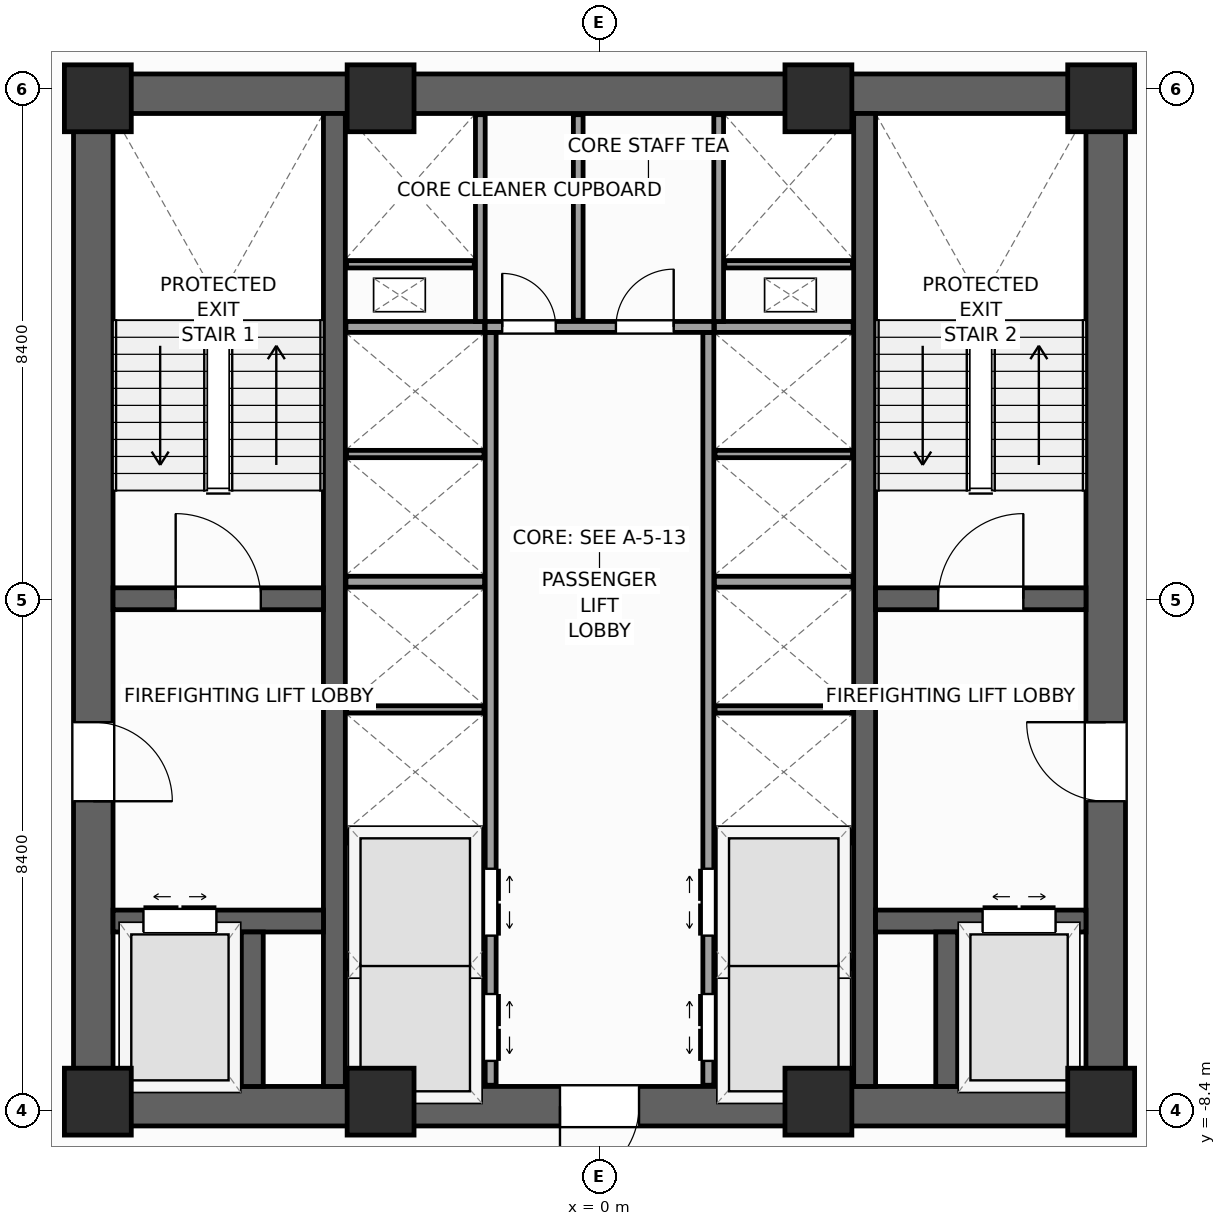
"""IFC4 building model, lengths in metres.
Left out: names, types, materials, properties, quantities, classifications, styles, units other than length and angle.
Written with IfcOpenShell. Run it as: python <this file> out.ifc"""

import sys

from ifc_helpers import new_model, si_unit, direction, frame, frame_2d, origin, origin_2d, place, context, subcontext, project, spatial, rectangle, extrude, source, transform, mapped, element, fill, save


model = new_model("IFC4")
c1 = context("Model", 3, precision=1e-05, world=origin(), true_north=direction((0.0, 1.0)))
c2 = subcontext(c1, "Body", "Model", "MODEL_VIEW")
j1 = project(units=[si_unit("LENGTHUNIT", "METRE"), si_unit("PLANEANGLEUNIT", "RADIAN")], contexts=[c1])
p1 = place(None, origin())
s1 = spatial("IfcSite", under=j1, at=p1, CompositionType="ELEMENT")
p2 = place(p1, origin())
s2 = spatial("IfcBuilding", under=s1, at=p2, CompositionType="ELEMENT")
p3 = place(p2, frame((0.0, 0.0, 103.2)))
s3 = spatial("IfcBuildingStorey", under=s2, at=p3, CompositionType="ELEMENT", Elevation=103.2)
p4 = place(p3, frame((-8.65, -8.325, 0.0), z_axis=(0.0, 0.0, 1.0), x_axis=(1.0, 0.0, 0.0)))
e1 = element("IfcWall", 1, at=p4, inside=s3, PredefinedType="SHEAR", context=c2, shape_type="SweptSolid", body=[
    extrude(rectangle(XDim=17.3, YDim=0.65, at=frame_2d((8.65, 0.0))), origin(), (0.0, 0.0, 1.0), 4.0),
])
p5 = place(p4, frame((8.0, 0.0, 0.0)))
e2 = element("IfcOpeningElement", 2, at=p5, cuts=e1, PredefinedType="OPENING", context=c2, shape_type="SweptSolid", body=[
    extrude(rectangle(XDim=1.3, YDim=2.2, at=frame_2d((0.65, 1.1))), frame((0.0, 0.335, 0.0), z_axis=(0.0, -1.0, 0.0), x_axis=(1.0, 0.0, 0.0)), (0.0, 0.0, 1.0), 0.67),
])
p6 = place(p3, frame((-8.65, 8.325, 0.0), z_axis=(0.0, 0.0, 1.0), x_axis=(1.0, 0.0, 0.0)))
e3 = element("IfcWall", 3, at=p6, inside=s3, PredefinedType="SHEAR", context=c2, shape_type="SweptSolid", body=[
    extrude(rectangle(XDim=17.3, YDim=0.65, at=frame_2d((8.65, 0.0))), origin(), (0.0, 0.0, 1.0), 4.0),
])
p7 = place(p3, frame((-8.325, -8.0, 0.0), z_axis=(0.0, 0.0, 1.0), x_axis=(0.0, 1.0, 0.0)))
e4 = element("IfcWall", 4, at=p7, inside=s3, PredefinedType="SHEAR", context=c2, shape_type="SweptSolid", body=[
    extrude(rectangle(XDim=16.0, YDim=0.65, at=frame_2d((8.0, 0.0))), origin(), (0.0, 0.0, 1.0), 4.0),
])
p8 = place(p7, frame((4.69, 0.0, 0.0)))
e5 = element("IfcOpeningElement", 5, at=p8, cuts=e4, PredefinedType="OPENING", context=c2, shape_type="SweptSolid", body=[
    extrude(rectangle(XDim=1.3, YDim=2.2, at=frame_2d((0.65, 1.1))), frame((0.0, 0.335, 0.0), z_axis=(0.0, -1.0, 0.0), x_axis=(1.0, 0.0, 0.0)), (0.0, 0.0, 1.0), 0.67),
])
p9 = place(p3, frame((8.325, -8.0, 0.0), z_axis=(0.0, 0.0, 1.0), x_axis=(0.0, 1.0, 0.0)))
e6 = element("IfcWall", 6, at=p9, inside=s3, PredefinedType="SHEAR", context=c2, shape_type="SweptSolid", body=[
    extrude(rectangle(XDim=16.0, YDim=0.65, at=frame_2d((8.0, 0.0))), origin(), (0.0, 0.0, 1.0), 4.0),
])
p10 = place(p9, frame((4.69, 0.0, 0.0)))
e7 = element("IfcOpeningElement", 7, at=p10, cuts=e6, PredefinedType="OPENING", context=c2, shape_type="SweptSolid", body=[
    extrude(rectangle(XDim=1.3, YDim=2.2, at=frame_2d((0.65, 1.1))), frame((0.0, 0.335, 0.0), z_axis=(0.0, -1.0, 0.0), x_axis=(1.0, 0.0, 0.0)), (0.0, 0.0, 1.0), 0.67),
])
for number, where, z_axis, x_axis in (
    (8, (-4.36, -8.0, 0.0), (0.0, 0.0, 1.0), (0.0, 1.0, 0.0)),
    (9, (4.36, -8.0, 0.0), (0.0, 0.0, 1.0), (0.0, 1.0, 0.0)),
):
    element("IfcWall", number, at=place(p3, frame(where, z_axis=z_axis, x_axis=x_axis)), inside=s3, PredefinedType="SHEAR", context=c2, shape_type="SweptSolid", body=[
        extrude(rectangle(XDim=16.0, YDim=0.36, at=frame_2d((8.0, 0.0))), origin(), (0.0, 0.0, 1.0), 4.0),
    ])
p11 = place(p3, frame((-8.0, 0.02, 0.0), z_axis=(0.0, 0.0, 1.0), x_axis=(1.0, 0.0, 0.0)))
e10 = element("IfcWall", 10, at=p11, inside=s3, PredefinedType="SHEAR", context=c2, shape_type="SweptSolid", body=[
    extrude(rectangle(XDim=3.46, YDim=0.36, at=frame_2d((1.73, 0.0))), origin(), (0.0, 0.0, 1.0), 4.0),
])
p12 = place(p11, frame((1.03, 0.0, 0.0)))
e11 = element("IfcOpeningElement", 11, at=p12, cuts=e10, PredefinedType="OPENING", context=c2, shape_type="SweptSolid", body=[
    extrude(rectangle(XDim=1.4, YDim=2.2, at=frame_2d((0.7, 1.1))), frame((0.0, 0.19, 0.0), z_axis=(0.0, -1.0, 0.0), x_axis=(1.0, 0.0, 0.0)), (0.0, 0.0, 1.0), 0.38),
])
p13 = place(p3, frame((4.54, 0.02, 0.0), z_axis=(0.0, 0.0, 1.0), x_axis=(1.0, 0.0, 0.0)))
e12 = element("IfcWall", 12, at=p13, inside=s3, PredefinedType="SHEAR", context=c2, shape_type="SweptSolid", body=[
    extrude(rectangle(XDim=3.46, YDim=0.36, at=frame_2d((1.73, 0.0))), origin(), (0.0, 0.0, 1.0), 4.0),
])
p14 = place(p13, frame((1.03, 0.0, 0.0)))
e13 = element("IfcOpeningElement", 13, at=p14, cuts=e12, PredefinedType="OPENING", context=c2, shape_type="SweptSolid", body=[
    extrude(rectangle(XDim=1.4, YDim=2.2, at=frame_2d((0.7, 1.1))), frame((0.0, 0.19, 0.0), z_axis=(0.0, -1.0, 0.0), x_axis=(1.0, 0.0, 0.0)), (0.0, 0.0, 1.0), 0.38),
])
p15 = place(p3, frame((-8.0, -5.28, 0.0), z_axis=(0.0, 0.0, 1.0), x_axis=(1.0, 0.0, 0.0)))
e14 = element("IfcWall", 14, at=p15, inside=s3, PredefinedType="SHEAR", context=c2, shape_type="SweptSolid", body=[
    extrude(rectangle(XDim=3.46, YDim=0.36, at=frame_2d((1.73, 0.0))), origin(), (0.0, 0.0, 1.0), 4.0),
])
p16 = place(p15, frame((0.5, 0.0, 0.0)))
e15 = element("IfcOpeningElement", 15, at=p16, cuts=e14, PredefinedType="OPENING", context=c2, shape_type="SweptSolid", body=[
    extrude(rectangle(XDim=1.2, YDim=2.25, at=frame_2d((0.6, 1.125))), frame((0.0, 0.19, 0.0), z_axis=(0.0, -1.0, 0.0), x_axis=(1.0, 0.0, 0.0)), (0.0, 0.0, 1.0), 0.38),
])
p17 = place(p3, frame((4.54, -5.28, 0.0), z_axis=(0.0, 0.0, 1.0), x_axis=(1.0, 0.0, 0.0)))
e16 = element("IfcWall", 16, at=p17, inside=s3, PredefinedType="SHEAR", context=c2, shape_type="SweptSolid", body=[
    extrude(rectangle(XDim=3.46, YDim=0.36, at=frame_2d((1.73, 0.0))), origin(), (0.0, 0.0, 1.0), 4.0),
])
p18 = place(p17, frame((1.76, 0.0, 0.0)))
e17 = element("IfcOpeningElement", 17, at=p18, cuts=e16, PredefinedType="OPENING", context=c2, shape_type="SweptSolid", body=[
    extrude(rectangle(XDim=1.2, YDim=2.25, at=frame_2d((0.6, 1.125))), frame((0.0, 0.19, 0.0), z_axis=(0.0, -1.0, 0.0), x_axis=(1.0, 0.0, 0.0)), (0.0, 0.0, 1.0), 0.38),
])
for number, where, z_axis, x_axis in (
    (18, (-5.71, -8.0, 0.0), (0.0, 0.0, 1.0), (0.0, 1.0, 0.0)),
    (19, (5.71, -8.0, 0.0), (0.0, 0.0, 1.0), (0.0, 1.0, 0.0)),
):
    element("IfcWall", number, at=place(p3, frame(where, z_axis=z_axis, x_axis=x_axis)), inside=s3, PredefinedType="SHEAR", context=c2, shape_type="SweptSolid", body=[
        extrude(rectangle(XDim=2.54, YDim=0.36, at=frame_2d((1.27, 0.0))), origin(), (0.0, 0.0, 1.0), 4.0),
    ])
m1 = source(origin(), c2, "Body", "SweptSolid", [
    extrude(rectangle(XDim=1.1, YDim=1.1, at=origin_2d()), origin(), (0.0, 0.0, 1.0), 4.0),
])
for number, where, z_axis, x_axis in (
    (20, (-8.25, -8.25, 0.0), (0.0, 0.0, 1.0), (1.0, 0.0, 0.0)),
    (21, (8.25, -8.25, 0.0), (0.0, 0.0, 1.0), (1.0, 0.0, 0.0)),
    (22, (8.25, 8.25, 0.0), (0.0, 0.0, 1.0), (1.0, 0.0, 0.0)),
    (23, (-8.25, 8.25, 0.0), (0.0, 0.0, 1.0), (1.0, 0.0, 0.0)),
    (24, (-3.6, -8.25, 0.0), (0.0, 0.0, 1.0), (1.0, 0.0, 0.0)),
    (25, (3.6, -8.25, 0.0), (0.0, 0.0, 1.0), (1.0, 0.0, 0.0)),
    (26, (-3.6, 8.25, 0.0), (0.0, 0.0, 1.0), (1.0, 0.0, 0.0)),
    (27, (3.6, 8.25, 0.0), (0.0, 0.0, 1.0), (1.0, 0.0, 0.0)),
):
    element("IfcColumn", number, at=place(p3, frame(where, z_axis=z_axis, x_axis=x_axis)), inside=s3, PredefinedType="PILASTER", context=c2, shape_type="MappedRepresentation", body=[
        mapped(m1, transform((0.0, 0.0, 0.0), scale=1.0)),
    ])
p19 = place(p3, frame((-1.79, -7.98, 0.0), z_axis=(0.0, 0.0, 1.0), x_axis=(0.0, 1.0, 0.0)))
e28 = element("IfcWall", 28, at=p19, inside=s3, PredefinedType="PARTITIONING", context=c2, shape_type="SweptSolid", body=[
    extrude(rectangle(XDim=12.38, YDim=0.18, at=frame_2d((6.19, 0.0))), origin(), (0.0, 0.0, 1.0), 3.74),
])
p20 = place(p19, frame((0.4, 0.0, 0.0)))
e29 = element("IfcOpeningElement", 29, at=p20, cuts=e28, PredefinedType="OPENING", context=c2, shape_type="SweptSolid", body=[
    extrude(rectangle(XDim=1.1, YDim=2.2, at=frame_2d((0.55, 1.1))), frame((0.0, 0.1, 0.0), z_axis=(0.0, -1.0, 0.0), x_axis=(1.0, 0.0, 0.0)), (0.0, 0.0, 1.0), 0.2),
])
p21 = place(p19, frame((2.46, 0.0, 0.0)))
e30 = element("IfcOpeningElement", 30, at=p21, cuts=e28, PredefinedType="OPENING", context=c2, shape_type="SweptSolid", body=[
    extrude(rectangle(XDim=1.1, YDim=2.2, at=frame_2d((0.55, 1.1))), frame((0.0, 0.1, 0.0), z_axis=(0.0, -1.0, 0.0), x_axis=(1.0, 0.0, 0.0)), (0.0, 0.0, 1.0), 0.2),
])
p22 = place(p3, frame((1.79, -7.98, 0.0), z_axis=(0.0, 0.0, 1.0), x_axis=(0.0, 1.0, 0.0)))
e31 = element("IfcWall", 31, at=p22, inside=s3, PredefinedType="PARTITIONING", context=c2, shape_type="SweptSolid", body=[
    extrude(rectangle(XDim=12.38, YDim=0.18, at=frame_2d((6.19, 0.0))), origin(), (0.0, 0.0, 1.0), 3.74),
])
p23 = place(p22, frame((0.4, 0.0, 0.0)))
e32 = element("IfcOpeningElement", 32, at=p23, cuts=e31, PredefinedType="OPENING", context=c2, shape_type="SweptSolid", body=[
    extrude(rectangle(XDim=1.1, YDim=2.2, at=frame_2d((0.55, 1.1))), frame((0.0, 0.1, 0.0), z_axis=(0.0, -1.0, 0.0), x_axis=(1.0, 0.0, 0.0)), (0.0, 0.0, 1.0), 0.2),
])
p24 = place(p22, frame((2.46, 0.0, 0.0)))
e33 = element("IfcOpeningElement", 33, at=p24, cuts=e31, PredefinedType="OPENING", context=c2, shape_type="SweptSolid", body=[
    extrude(rectangle(XDim=1.1, YDim=2.2, at=frame_2d((0.55, 1.1))), frame((0.0, 0.1, 0.0), z_axis=(0.0, -1.0, 0.0), x_axis=(1.0, 0.0, 0.0)), (0.0, 0.0, 1.0), 0.2),
])
p25 = place(p3, frame((-1.88, 4.49, 0.0), z_axis=(0.0, 0.0, 1.0), x_axis=(1.0, 0.0, 0.0)))
e34 = element("IfcWall", 34, at=p25, inside=s3, PredefinedType="PARTITIONING", context=c2, shape_type="SweptSolid", body=[
    extrude(rectangle(XDim=3.76, YDim=0.18, at=frame_2d((1.88, 0.0))), origin(), (0.0, 0.0, 1.0), 3.74),
])
p26 = place(p25, frame((0.28, 0.0, 0.0)))
e35 = element("IfcOpeningElement", 35, at=p26, cuts=e34, PredefinedType="OPENING", context=c2, shape_type="SweptSolid", body=[
    extrude(rectangle(XDim=0.88, YDim=2.1, at=frame_2d((0.44, 1.05))), frame((0.0, 0.1, 0.0), z_axis=(0.0, -1.0, 0.0), x_axis=(1.0, 0.0, 0.0)), (0.0, 0.0, 1.0), 0.2),
])
p27 = place(p25, frame((2.15, 0.0, 0.0)))
e36 = element("IfcOpeningElement", 36, at=p27, cuts=e34, PredefinedType="OPENING", context=c2, shape_type="SweptSolid", body=[
    extrude(rectangle(XDim=0.95, YDim=2.1, at=frame_2d((0.475, 1.05))), frame((0.0, 0.1, 0.0), z_axis=(0.0, -1.0, 0.0), x_axis=(1.0, 0.0, 0.0)), (0.0, 0.0, 1.0), 0.2),
])
for number, where, z_axis, x_axis in (
    (37, (-4.17, -3.9, 0.0), (0.0, 0.0, 1.0), (1.0, 0.0, 0.0)),
    (38, (1.89, -3.9, 0.0), (0.0, 0.0, 1.0), (1.0, 0.0, 0.0)),
    (39, (-4.17, 0.3, 0.0), (0.0, 0.0, 1.0), (1.0, 0.0, 0.0)),
    (40, (1.89, 0.3, 0.0), (0.0, 0.0, 1.0), (1.0, 0.0, 0.0)),
    (41, (-4.17, 4.49, 0.0), (0.0, 0.0, 1.0), (1.0, 0.0, 0.0)),
    (42, (1.89, 4.49, 0.0), (0.0, 0.0, 1.0), (1.0, 0.0, 0.0)),
):
    element("IfcWall", number, at=place(p3, frame(where, z_axis=z_axis, x_axis=x_axis)), inside=s3, PredefinedType="PARTITIONING", context=c2, shape_type="SweptSolid", body=[
        extrude(rectangle(XDim=2.28, YDim=0.18, at=frame_2d((1.14, 0.0))), origin(), (0.0, 0.0, 1.0), 3.74),
    ])
for number, where, z_axis, x_axis in (
    (43, (-4.16, -6.0, 0.0), (0.0, 0.0, 1.0), (1.0, 0.0, 0.0)),
    (44, (1.9, -6.0, 0.0), (0.0, 0.0, 1.0), (1.0, 0.0, 0.0)),
    (45, (-4.16, -1.8, 0.0), (0.0, 0.0, 1.0), (1.0, 0.0, 0.0)),
    (46, (1.9, -1.8, 0.0), (0.0, 0.0, 1.0), (1.0, 0.0, 0.0)),
    (47, (-4.16, 2.4, 0.0), (0.0, 0.0, 1.0), (1.0, 0.0, 0.0)),
    (48, (1.9, 2.4, 0.0), (0.0, 0.0, 1.0), (1.0, 0.0, 0.0)),
):
    element("IfcWall", number, at=place(p3, frame(where, z_axis=z_axis, x_axis=x_axis)), inside=s3, PredefinedType="PARTITIONING", context=c2, shape_type="SweptSolid", body=[
        extrude(rectangle(XDim=2.26, YDim=0.12, at=frame_2d((1.13, 0.0))), origin(), (0.0, 0.0, 1.0), 3.74),
    ])
for number, where, z_axis, x_axis in (
    (49, (-1.96, 4.58, 0.0), (0.0, 0.0, 1.0), (0.0, 1.0, 0.0)),
    (50, (1.96, 4.58, 0.0), (0.0, 0.0, 1.0), (0.0, 1.0, 0.0)),
):
    element("IfcWall", number, at=place(p3, frame(where, z_axis=z_axis, x_axis=x_axis)), inside=s3, PredefinedType="PARTITIONING", context=c2, shape_type="SweptSolid", body=[
        extrude(rectangle(XDim=3.4, YDim=0.16, at=frame_2d((1.7, 0.0))), origin(), (0.0, 0.0, 1.0), 3.74),
    ])
for number, where, z_axis, x_axis in (
    (51, (-4.16, 5.52, 0.0), (0.0, 0.0, 1.0), (1.0, 0.0, 0.0)),
    (52, (2.06, 5.52, 0.0), (0.0, 0.0, 1.0), (1.0, 0.0, 0.0)),
):
    element("IfcWall", number, at=place(p3, frame(where, z_axis=z_axis, x_axis=x_axis)), inside=s3, PredefinedType="PARTITIONING", context=c2, shape_type="SweptSolid", body=[
        extrude(rectangle(XDim=2.1, YDim=0.12, at=frame_2d((1.05, 0.0))), origin(), (0.0, 0.0, 1.0), 3.74),
    ])
p28 = place(p3, frame((-0.35, 4.6, 0.0), z_axis=(0.0, 0.0, 1.0), x_axis=(0.0, 1.0, 0.0)))
e53 = element("IfcWall", 53, at=p28, inside=s3, PredefinedType="PARTITIONING", context=c2, shape_type="SweptSolid", body=[
    extrude(rectangle(XDim=3.38, YDim=0.16, at=frame_2d((1.69, 0.0))), origin(), (0.0, 0.0, 1.0), 3.74),
])
m2 = source(origin(), c2, "Body", "SweptSolid", [
    extrude(rectangle(XDim=1.4, YDim=2.2, at=frame_2d((0.7, 1.1))), frame((0.0, 0.025, 0.0), z_axis=(0.0, -1.0, 0.0), x_axis=(1.0, 0.0, 0.0)), (0.0, 0.0, 1.0), 0.05),
])
p29 = place(p12, origin())
e54 = element("IfcDoor", 54, at=p29, inside=s3, OperationType="SINGLE_SWING_LEFT", PredefinedType="DOOR", context=c2, shape_type="MappedRepresentation", body=[
    mapped(m2, transform((0.0, 0.0, 0.0), scale=1.0)),
])
fill(e11, e54)
p30 = place(p14, origin())
e55 = element("IfcDoor", 55, at=p30, inside=s3, OperationType="SINGLE_SWING_RIGHT", PredefinedType="DOOR", context=c2, shape_type="MappedRepresentation", body=[
    mapped(m2, transform((0.0, 0.0, 0.0), scale=1.0)),
])
fill(e13, e55)
m3 = source(origin(), c2, "Body", "SweptSolid", [
    extrude(rectangle(XDim=1.3, YDim=2.2, at=frame_2d((0.65, 1.1))), frame((0.0, 0.025, 0.0), z_axis=(0.0, -1.0, 0.0), x_axis=(1.0, 0.0, 0.0)), (0.0, 0.0, 1.0), 0.05),
])
p31 = place(p8, frame((1.3, 0.0, 0.0), z_axis=(0.0, 0.0, 1.0), x_axis=(-1.0, 0.0, 0.0)))
e56 = element("IfcDoor", 56, at=p31, inside=s3, OperationType="SINGLE_SWING_LEFT", PredefinedType="DOOR", context=c2, shape_type="MappedRepresentation", body=[
    mapped(m3, transform((0.0, 0.0, 0.0), scale=1.0)),
])
fill(e5, e56)
p32 = place(p10, origin())
e57 = element("IfcDoor", 57, at=p32, inside=s3, OperationType="SINGLE_SWING_RIGHT", PredefinedType="DOOR", context=c2, shape_type="MappedRepresentation", body=[
    mapped(m3, transform((0.0, 0.0, 0.0), scale=1.0)),
])
fill(e7, e57)
p33 = place(p5, frame((1.3, 0.0, 0.0), z_axis=(0.0, 0.0, 1.0), x_axis=(-1.0, 0.0, 0.0)))
e58 = element("IfcDoor", 58, at=p33, inside=s3, OperationType="SINGLE_SWING_LEFT", PredefinedType="DOOR", context=c2, shape_type="MappedRepresentation", body=[
    mapped(m3, transform((0.0, 0.0, 0.0), scale=1.0)),
])
fill(e2, e58)
m4 = source(origin(), c2, "Body", "SweptSolid", [
    extrude(rectangle(XDim=1.2, YDim=2.25, at=frame_2d((0.6, 1.125))), frame((0.0, 0.025, 0.0), z_axis=(0.0, -1.0, 0.0), x_axis=(1.0, 0.0, 0.0)), (0.0, 0.0, 1.0), 0.05),
])
p34 = place(p16, origin())
e59 = element("IfcDoor", 59, at=p34, inside=s3, OperationType="DOUBLE_DOOR_SLIDING", PredefinedType="DOOR", context=c2, shape_type="MappedRepresentation", body=[
    mapped(m4, transform((0.0, 0.0, 0.0), scale=1.0)),
])
fill(e15, e59)
p35 = place(p18, origin())
e60 = element("IfcDoor", 60, at=p35, inside=s3, OperationType="DOUBLE_DOOR_SLIDING", PredefinedType="DOOR", context=c2, shape_type="MappedRepresentation", body=[
    mapped(m4, transform((0.0, 0.0, 0.0), scale=1.0)),
])
fill(e17, e60)
m5 = source(origin(), c2, "Body", "SweptSolid", [
    extrude(rectangle(XDim=1.1, YDim=2.2, at=frame_2d((0.55, 1.1))), frame((0.0, 0.025, 0.0), z_axis=(0.0, -1.0, 0.0), x_axis=(1.0, 0.0, 0.0)), (0.0, 0.0, 1.0), 0.05),
])
p36 = place(p20, frame((1.1, 0.0, 0.0), z_axis=(0.0, 0.0, 1.0), x_axis=(-1.0, 0.0, 0.0)))
e61 = element("IfcDoor", 61, at=p36, inside=s3, OperationType="DOUBLE_DOOR_SLIDING", PredefinedType="DOOR", context=c2, shape_type="MappedRepresentation", body=[
    mapped(m5, transform((0.0, 0.0, 0.0), scale=1.0)),
])
fill(e29, e61)
p37 = place(p21, frame((1.1, 0.0, 0.0), z_axis=(0.0, 0.0, 1.0), x_axis=(-1.0, 0.0, 0.0)))
e62 = element("IfcDoor", 62, at=p37, inside=s3, OperationType="DOUBLE_DOOR_SLIDING", PredefinedType="DOOR", context=c2, shape_type="MappedRepresentation", body=[
    mapped(m5, transform((0.0, 0.0, 0.0), scale=1.0)),
])
fill(e30, e62)
p38 = place(p23, origin())
e63 = element("IfcDoor", 63, at=p38, inside=s3, OperationType="DOUBLE_DOOR_SLIDING", PredefinedType="DOOR", context=c2, shape_type="MappedRepresentation", body=[
    mapped(m5, transform((0.0, 0.0, 0.0), scale=1.0)),
])
fill(e32, e63)
p39 = place(p24, origin())
e64 = element("IfcDoor", 64, at=p39, inside=s3, OperationType="DOUBLE_DOOR_SLIDING", PredefinedType="DOOR", context=c2, shape_type="MappedRepresentation", body=[
    mapped(m5, transform((0.0, 0.0, 0.0), scale=1.0)),
])
fill(e33, e64)
m6 = source(origin(), c2, "Body", "SweptSolid", [
    extrude(rectangle(XDim=0.88, YDim=2.1, at=frame_2d((0.44, 1.05))), frame((0.0, 0.025, 0.0), z_axis=(0.0, -1.0, 0.0), x_axis=(1.0, 0.0, 0.0)), (0.0, 0.0, 1.0), 0.05),
])
p40 = place(p26, origin())
e65 = element("IfcDoor", 65, at=p40, inside=s3, OperationType="SINGLE_SWING_LEFT", PredefinedType="DOOR", context=c2, shape_type="MappedRepresentation", body=[
    mapped(m6, transform((0.0, 0.0, 0.0), scale=1.0)),
])
fill(e35, e65)
m7 = source(origin(), c2, "Body", "SweptSolid", [
    extrude(rectangle(XDim=0.95, YDim=2.1, at=frame_2d((0.475, 1.05))), frame((0.0, 0.025, 0.0), z_axis=(0.0, -1.0, 0.0), x_axis=(1.0, 0.0, 0.0)), (0.0, 0.0, 1.0), 0.05),
])
p41 = place(p27, origin())
e66 = element("IfcDoor", 66, at=p41, inside=s3, OperationType="SINGLE_SWING_RIGHT", PredefinedType="DOOR", context=c2, shape_type="MappedRepresentation", body=[
    mapped(m7, transform((0.0, 0.0, 0.0), scale=1.0)),
])
fill(e36, e66)
save(model, sys.argv[1])
